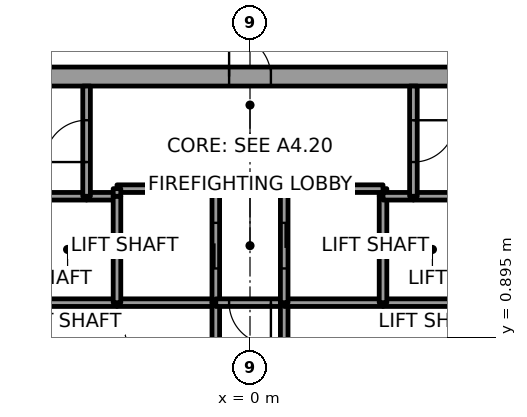
"""IFC4 building model, lengths in metres.
Left out: names, types, materials, properties, quantities, classifications, styles, units other than length and angle.
Written with IfcOpenShell. Run it as: python <this file> out.ifc"""

import sys

from ifc_helpers import new_model, si_unit, direction, frame, frame_2d, origin, place, context, subcontext, project, spatial, rectangle, extrude, element, fill, save


model = new_model("IFC4")
c1 = context("Model", 3, precision=1e-05, world=origin(), true_north=direction((0.0, 1.0)))
c2 = subcontext(c1, "Body", "Model", "MODEL_VIEW")
j1 = project(units=[si_unit("LENGTHUNIT", "METRE"), si_unit("PLANEANGLEUNIT", "RADIAN")], contexts=[c1])
p1 = place(None, origin())
s1 = spatial("IfcSite", under=j1, at=p1, CompositionType="ELEMENT")
p2 = place(p1, origin())
s2 = spatial("IfcBuilding", under=s1, at=p2, CompositionType="ELEMENT")
p3 = place(p2, frame((0.0, 0.0, 88.7)))
s3 = spatial("IfcBuildingStorey", under=s2, at=p3, CompositionType="ELEMENT", Elevation=88.7)
p4 = place(p3, frame((-11.0, 7.75, 0.0), z_axis=(0.0, 0.0, 1.0), x_axis=(1.0, 0.0, 0.0)))
e1 = element("IfcWall", 1, at=p4, inside=s3, PredefinedType="SHEAR", context=c2, shape_type="SweptSolid", body=[
    extrude(rectangle(XDim=22.0, YDim=0.5, at=frame_2d((11.0, 0.0))), origin(), (0.0, 0.0, 1.0), 3.7),
])
p5 = place(p4, frame((10.45, 0.0, 0.0)))
e2 = element("IfcOpeningElement", 2, at=p5, cuts=e1, PredefinedType="OPENING", context=c2, shape_type="SweptSolid", body=[
    extrude(rectangle(XDim=1.1, YDim=2.1, at=frame_2d((0.55, 1.05))), frame((0.0, 0.25, 0.0), z_axis=(0.0, -1.0, 0.0), x_axis=(1.0, 0.0, 0.0)), (0.0, 0.0, 1.0), 0.5),
])
p6 = place(p3, frame((-3.5, 1.8, 0.0), z_axis=(0.0, 0.0, 1.0), x_axis=(-1.0, 0.0, 0.0)))
e3 = element("IfcWall", 3, at=p6, inside=s3, PredefinedType="SOLIDWALL", context=c2, shape_type="SweptSolid", body=[
    extrude(rectangle(XDim=2.6, YDim=0.2, at=frame_2d((1.3, 0.0))), origin(), (0.0, 0.0, 1.0), 3.55),
])
p7 = place(p3, frame((-4.3, 4.6, 0.0), z_axis=(0.0, 0.0, 1.0), x_axis=(-1.0, 0.0, 0.0)))
e4 = element("IfcWall", 4, at=p7, inside=s3, PredefinedType="SOLIDWALL", context=c2, shape_type="SweptSolid", body=[
    extrude(rectangle(XDim=1.8, YDim=0.2, at=frame_2d((0.9, 0.0))), origin(), (0.0, 0.0, 1.0), 3.55),
])
p8 = place(p3, frame((-3.5, 4.6, 0.0), z_axis=(0.0, 0.0, 1.0), x_axis=(-1.0, 0.0, 0.0)))
e5 = element("IfcWall", 5, at=p8, inside=s3, PredefinedType="SOLIDWALL", context=c2, shape_type="SweptSolid", body=[
    extrude(rectangle(XDim=0.8, YDim=0.2, at=frame_2d((0.4, 0.0))), origin(), (0.0, 0.0, 1.0), 3.55),
])
p9 = place(p3, frame((-4.3, 4.6, 0.0), z_axis=(0.0, 0.0, 1.0), x_axis=(0.0, 1.0, 0.0)))
e6 = element("IfcWall", 6, at=p9, inside=s3, PredefinedType="SOLIDWALL", context=c2, shape_type="SweptSolid", body=[
    extrude(rectangle(XDim=2.9, YDim=0.2, at=frame_2d((1.45, 0.0))), origin(), (0.0, 0.0, 1.0), 3.55),
])
p10 = place(p9, frame((0.9, 0.0, 0.0)))
e7 = element("IfcOpeningElement", 7, at=p10, cuts=e6, PredefinedType="OPENING", context=c2, shape_type="SweptSolid", body=[
    extrude(rectangle(XDim=1.1, YDim=2.1, at=frame_2d((0.55, 1.05))), frame((0.0, 0.1, 0.0), z_axis=(0.0, -1.0, 0.0), x_axis=(1.0, 0.0, 0.0)), (0.0, 0.0, 1.0), 0.2),
])
p11 = place(p3, frame((-0.9, 1.8, 0.0), z_axis=(0.0, 0.0, 1.0), x_axis=(-1.0, 0.0, 0.0)))
e8 = element("IfcWall", 8, at=p11, inside=s3, PredefinedType="SOLIDWALL", context=c2, shape_type="SweptSolid", body=[
    extrude(rectangle(XDim=2.6, YDim=0.2, at=frame_2d((1.3, 0.0))), origin(), (0.0, 0.0, 1.0), 3.55),
])
p12 = place(p3, frame((-3.5, 4.6, 0.0), z_axis=(0.0, 0.0, 1.0), x_axis=(0.0, -1.0, 0.0)))
e9 = element("IfcWall", 9, at=p12, inside=s3, PredefinedType="SOLIDWALL", context=c2, shape_type="SweptSolid", body=[
    extrude(rectangle(XDim=2.8, YDim=0.2, at=frame_2d((1.4, 0.0))), origin(), (0.0, 0.0, 1.0), 3.55),
])
p13 = place(p3, frame((-0.9, 1.8, 0.0), z_axis=(0.0, 0.0, 1.0), x_axis=(0.0, 1.0, 0.0)))
e10 = element("IfcWall", 10, at=p13, inside=s3, PredefinedType="SOLIDWALL", context=c2, shape_type="SweptSolid", body=[
    extrude(rectangle(XDim=3.0, YDim=0.2, at=frame_2d((1.5, 0.0))), origin(), (0.0, 0.0, 1.0), 3.55),
])
p14 = place(p13, frame((0.9, 0.0, 0.0)))
e11 = element("IfcOpeningElement", 11, at=p14, cuts=e10, PredefinedType="OPENING", context=c2, shape_type="SweptSolid", body=[
    extrude(rectangle(XDim=1.2, YDim=2.1, at=frame_2d((0.6, 1.05))), frame((0.0, 0.1, 0.0), z_axis=(0.0, -1.0, 0.0), x_axis=(1.0, 0.0, 0.0)), (0.0, 0.0, 1.0), 0.2),
])
p15 = place(p3, frame((-0.9, 4.8, 0.0), z_axis=(0.0, 0.0, 1.0), x_axis=(-1.0, 0.0, 0.0)))
e12 = element("IfcWall", 12, at=p15, inside=s3, PredefinedType="SOLIDWALL", context=c2, shape_type="SweptSolid", body=[
    extrude(rectangle(XDim=2.6, YDim=0.2, at=frame_2d((1.3, 0.0))), origin(), (0.0, 0.0, 1.0), 3.55),
])
p16 = place(p3, frame((-3.5, 4.8, 0.0), z_axis=(0.0, 0.0, 1.0), x_axis=(0.0, -1.0, 0.0)))
e13 = element("IfcWall", 13, at=p16, inside=s3, PredefinedType="SOLIDWALL", context=c2, shape_type="SweptSolid", body=[
    extrude(rectangle(XDim=0.2, YDim=0.2, at=frame_2d((0.1, 0.0))), origin(), (0.0, 0.0, 1.0), 3.55),
])
p17 = place(p3, frame((-0.9, 1.8, 0.0), z_axis=(0.0, 0.0, 1.0), x_axis=(0.0, -1.0, 0.0)))
e14 = element("IfcWall", 14, at=p17, inside=s3, PredefinedType="SOLIDWALL", context=c2, shape_type="SweptSolid", body=[
    extrude(rectangle(XDim=3.6, YDim=0.2, at=frame_2d((1.8, 0.0))), origin(), (0.0, 0.0, 1.0), 3.55),
])
p18 = place(p17, frame((1.05, 0.0, 0.0)))
e15 = element("IfcOpeningElement", 15, at=p18, cuts=e14, PredefinedType="OPENING", context=c2, shape_type="SweptSolid", body=[
    extrude(rectangle(XDim=1.5, YDim=2.1, at=frame_2d((0.75, 1.05))), frame((0.0, 0.1, 0.0), z_axis=(0.0, -1.0, 0.0), x_axis=(1.0, 0.0, 0.0)), (0.0, 0.0, 1.0), 0.2),
])
p19 = place(p3, frame((0.9, 1.8, 0.0), z_axis=(0.0, 0.0, 1.0), x_axis=(-1.0, 0.0, 0.0)))
e16 = element("IfcWall", 16, at=p19, inside=s3, PredefinedType="SOLIDWALL", context=c2, shape_type="SweptSolid", body=[
    extrude(rectangle(XDim=1.8, YDim=0.2, at=frame_2d((0.9, 0.0))), origin(), (0.0, 0.0, 1.0), 3.55),
])
p20 = place(p19, frame((0.35, 0.0, 0.0)))
e17 = element("IfcOpeningElement", 17, at=p20, cuts=e16, PredefinedType="OPENING", context=c2, shape_type="SweptSolid", body=[
    extrude(rectangle(XDim=1.1, YDim=2.1, at=frame_2d((0.55, 1.05))), frame((0.0, 0.1, 0.0), z_axis=(0.0, -1.0, 0.0), x_axis=(1.0, 0.0, 0.0)), (0.0, 0.0, 1.0), 0.2),
])
p21 = place(p3, frame((0.9, -1.8, 0.0), z_axis=(0.0, 0.0, 1.0), x_axis=(0.0, 1.0, 0.0)))
e18 = element("IfcWall", 18, at=p21, inside=s3, PredefinedType="SOLIDWALL", context=c2, shape_type="SweptSolid", body=[
    extrude(rectangle(XDim=3.6, YDim=0.2, at=frame_2d((1.8, 0.0))), origin(), (0.0, 0.0, 1.0), 3.55),
])
p22 = place(p21, frame((1.05, 0.0, 0.0)))
e19 = element("IfcOpeningElement", 19, at=p22, cuts=e18, PredefinedType="OPENING", context=c2, shape_type="SweptSolid", body=[
    extrude(rectangle(XDim=1.5, YDim=2.1, at=frame_2d((0.75, 1.05))), frame((0.0, 0.1, 0.0), z_axis=(0.0, -1.0, 0.0), x_axis=(1.0, 0.0, 0.0)), (0.0, 0.0, 1.0), 0.2),
])
p23 = place(p3, frame((3.5, 1.8, 0.0), z_axis=(0.0, 0.0, 1.0), x_axis=(-1.0, 0.0, 0.0)))
e20 = element("IfcWall", 20, at=p23, inside=s3, PredefinedType="SOLIDWALL", context=c2, shape_type="SweptSolid", body=[
    extrude(rectangle(XDim=2.6, YDim=0.2, at=frame_2d((1.3, 0.0))), origin(), (0.0, 0.0, 1.0), 3.55),
])
p24 = place(p3, frame((3.5, 4.6, 0.0), z_axis=(0.0, 0.0, 1.0), x_axis=(0.0, 1.0, 0.0)))
e21 = element("IfcWall", 21, at=p24, inside=s3, PredefinedType="SOLIDWALL", context=c2, shape_type="SweptSolid", body=[
    extrude(rectangle(XDim=0.2, YDim=0.2, at=frame_2d((0.1, 0.0))), origin(), (0.0, 0.0, 1.0), 3.55),
])
p25 = place(p3, frame((3.5, 4.8, 0.0), z_axis=(0.0, 0.0, 1.0), x_axis=(-1.0, 0.0, 0.0)))
e22 = element("IfcWall", 22, at=p25, inside=s3, PredefinedType="SOLIDWALL", context=c2, shape_type="SweptSolid", body=[
    extrude(rectangle(XDim=2.6, YDim=0.2, at=frame_2d((1.3, 0.0))), origin(), (0.0, 0.0, 1.0), 3.55),
])
p26 = place(p3, frame((0.9, 4.8, 0.0), z_axis=(0.0, 0.0, 1.0), x_axis=(0.0, -1.0, 0.0)))
e23 = element("IfcWall", 23, at=p26, inside=s3, PredefinedType="SOLIDWALL", context=c2, shape_type="SweptSolid", body=[
    extrude(rectangle(XDim=3.0, YDim=0.2, at=frame_2d((1.5, 0.0))), origin(), (0.0, 0.0, 1.0), 3.55),
])
p27 = place(p26, frame((0.9, 0.0, 0.0)))
e24 = element("IfcOpeningElement", 24, at=p27, cuts=e23, PredefinedType="OPENING", context=c2, shape_type="SweptSolid", body=[
    extrude(rectangle(XDim=1.2, YDim=2.1, at=frame_2d((0.6, 1.05))), frame((0.0, 0.1, 0.0), z_axis=(0.0, -1.0, 0.0), x_axis=(1.0, 0.0, 0.0)), (0.0, 0.0, 1.0), 0.2),
])
p28 = place(p3, frame((6.1, 1.8, 0.0), z_axis=(0.0, 0.0, 1.0), x_axis=(-1.0, 0.0, 0.0)))
e25 = element("IfcWall", 25, at=p28, inside=s3, PredefinedType="SOLIDWALL", context=c2, shape_type="SweptSolid", body=[
    extrude(rectangle(XDim=2.6, YDim=0.2, at=frame_2d((1.3, 0.0))), origin(), (0.0, 0.0, 1.0), 3.55),
])
p29 = place(p3, frame((3.5, 1.8, 0.0), z_axis=(0.0, 0.0, 1.0), x_axis=(0.0, 1.0, 0.0)))
e26 = element("IfcWall", 26, at=p29, inside=s3, PredefinedType="SOLIDWALL", context=c2, shape_type="SweptSolid", body=[
    extrude(rectangle(XDim=2.8, YDim=0.2, at=frame_2d((1.4, 0.0))), origin(), (0.0, 0.0, 1.0), 3.55),
])
p30 = place(p3, frame((4.3, 4.6, 0.0), z_axis=(0.0, 0.0, 1.0), x_axis=(-1.0, 0.0, 0.0)))
e27 = element("IfcWall", 27, at=p30, inside=s3, PredefinedType="SOLIDWALL", context=c2, shape_type="SweptSolid", body=[
    extrude(rectangle(XDim=0.8, YDim=0.2, at=frame_2d((0.4, 0.0))), origin(), (0.0, 0.0, 1.0), 3.55),
])
p31 = place(p3, frame((6.1, 4.6, 0.0), z_axis=(0.0, 0.0, 1.0), x_axis=(-1.0, 0.0, 0.0)))
e28 = element("IfcWall", 28, at=p31, inside=s3, PredefinedType="SOLIDWALL", context=c2, shape_type="SweptSolid", body=[
    extrude(rectangle(XDim=1.8, YDim=0.2, at=frame_2d((0.9, 0.0))), origin(), (0.0, 0.0, 1.0), 3.55),
])
p32 = place(p3, frame((4.3, 7.5, 0.0), z_axis=(0.0, 0.0, 1.0), x_axis=(0.0, -1.0, 0.0)))
e29 = element("IfcWall", 29, at=p32, inside=s3, PredefinedType="SOLIDWALL", context=c2, shape_type="SweptSolid", body=[
    extrude(rectangle(XDim=2.9, YDim=0.2, at=frame_2d((1.45, 0.0))), origin(), (0.0, 0.0, 1.0), 3.55),
])
p33 = place(p32, frame((0.9, 0.0, 0.0)))
e30 = element("IfcOpeningElement", 30, at=p33, cuts=e29, PredefinedType="OPENING", context=c2, shape_type="SweptSolid", body=[
    extrude(rectangle(XDim=1.1, YDim=2.1, at=frame_2d((0.55, 1.05))), frame((0.0, 0.1, 0.0), z_axis=(0.0, -1.0, 0.0), x_axis=(1.0, 0.0, 0.0)), (0.0, 0.0, 1.0), 0.2),
])
p34 = place(p14, origin())
e31 = element("IfcDoor", 31, at=p34, inside=s3, OperationType="SLIDING_TO_LEFT", PredefinedType="DOOR", context=c2, shape_type="SweptSolid", body=[
    extrude(rectangle(XDim=1.2, YDim=2.1, at=frame_2d((0.6, 1.05))), frame((0.0, 0.025, 0.0), z_axis=(0.0, -1.0, 0.0), x_axis=(1.0, 0.0, 0.0)), (0.0, 0.0, 1.0), 0.05),
])
fill(e11, e31)
p35 = place(p27, origin())
e32 = element("IfcDoor", 32, at=p35, inside=s3, OperationType="SLIDING_TO_LEFT", PredefinedType="DOOR", context=c2, shape_type="SweptSolid", body=[
    extrude(rectangle(XDim=1.2, YDim=2.1, at=frame_2d((0.6, 1.05))), frame((0.0, 0.025, 0.0), z_axis=(0.0, -1.0, 0.0), x_axis=(1.0, 0.0, 0.0)), (0.0, 0.0, 1.0), 0.05),
])
fill(e24, e32)
p36 = place(p20, origin())
e33 = element("IfcDoor", 33, at=p36, inside=s3, OperationType="SINGLE_SWING_LEFT", PredefinedType="DOOR", context=c2, shape_type="SweptSolid", body=[
    extrude(rectangle(XDim=1.1, YDim=2.1, at=frame_2d((0.55, 1.05))), frame((0.0, 0.025, 0.0), z_axis=(0.0, -1.0, 0.0), x_axis=(1.0, 0.0, 0.0)), (0.0, 0.0, 1.0), 0.05),
])
fill(e17, e33)
p37 = place(p10, origin())
e34 = element("IfcDoor", 34, at=p37, inside=s3, OperationType="SINGLE_SWING_RIGHT", PredefinedType="DOOR", context=c2, shape_type="SweptSolid", body=[
    extrude(rectangle(XDim=1.1, YDim=2.1, at=frame_2d((0.55, 1.05))), frame((0.0, 0.025, 0.0), z_axis=(0.0, -1.0, 0.0), x_axis=(1.0, 0.0, 0.0)), (0.0, 0.0, 1.0), 0.05),
])
fill(e7, e34)
p38 = place(p33, origin())
e35 = element("IfcDoor", 35, at=p38, inside=s3, OperationType="SINGLE_SWING_LEFT", PredefinedType="DOOR", context=c2, shape_type="SweptSolid", body=[
    extrude(rectangle(XDim=1.1, YDim=2.1, at=frame_2d((0.55, 1.05))), frame((0.0, 0.025, 0.0), z_axis=(0.0, -1.0, 0.0), x_axis=(1.0, 0.0, 0.0)), (0.0, 0.0, 1.0), 0.05),
])
fill(e30, e35)
p39 = place(p5, origin())
e36 = element("IfcDoor", 36, at=p39, inside=s3, OperationType="SINGLE_SWING_RIGHT", PredefinedType="DOOR", context=c2, shape_type="SweptSolid", body=[
    extrude(rectangle(XDim=1.1, YDim=2.1, at=frame_2d((0.55, 1.05))), frame((0.0, 0.025, 0.0), z_axis=(0.0, -1.0, 0.0), x_axis=(1.0, 0.0, 0.0)), (0.0, 0.0, 1.0), 0.05),
])
fill(e2, e36)
save(model, sys.argv[1])
